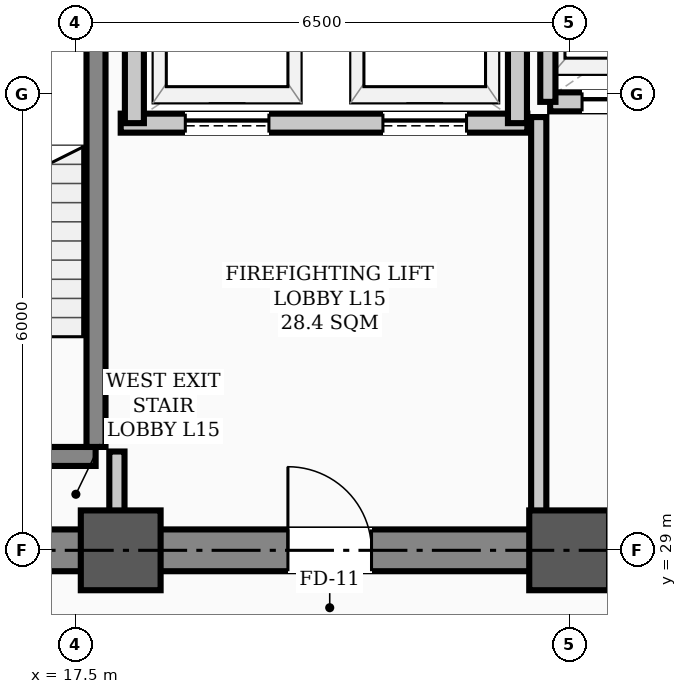
"""IFC4 building model, lengths in metres.
Left out: names, types, materials, properties, quantities, classifications, styles, units other than length and angle.
Written with IfcOpenShell. Run it as: python <this file> out.ifc"""

import sys

from ifc_helpers import new_model, si_unit, direction, frame, frame_2d, origin, origin_2d, place, context, subcontext, project, spatial, rectangle, hollow_rectangle, extrude, element, fill, save


model = new_model("IFC4")
c1 = context("Model", 3, precision=1e-05, world=origin(), true_north=direction((0.0, 1.0)))
c2 = subcontext(c1, "Body", "Model", "MODEL_VIEW")
j1 = project(units=[si_unit("LENGTHUNIT", "METRE"), si_unit("PLANEANGLEUNIT", "RADIAN")], contexts=[c1])
p1 = place(None, origin())
s1 = spatial("IfcSite", under=j1, at=p1, CompositionType="ELEMENT")
p2 = place(p1, origin())
s2 = spatial("IfcBuilding", under=s1, at=p2, CompositionType="ELEMENT")
p3 = place(p2, frame((0.0, 0.0, 61.6)))
s3 = spatial("IfcBuildingStorey", under=s2, at=p3, CompositionType="ELEMENT", Elevation=61.6)
for number, where, z_axis, x_axis in (
    (1, (18.1, 29.0, 0.0), (0.0, 0.0, 1.0), (1.0, 0.0, 0.0)),
    (2, (24.0, 29.0, 0.0), (0.0, 0.0, 1.0), (1.0, 0.0, 0.0)),
):
    element("IfcColumn", number, at=place(p3, frame(where, z_axis=z_axis, x_axis=x_axis)), inside=s3, PredefinedType="COLUMN", context=c2, shape_type="SweptSolid", body=[
        extrude(hollow_rectangle(XDim=1.05, YDim=1.05, WallThickness=0.038, InnerFilletRadius=0.019, OuterFilletRadius=0.057, at=origin_2d()), origin(), (0.0, 0.0, 1.0), 3.9),
    ])
p4 = place(p3, frame((13.5, 29.0, 0.0), z_axis=(0.0, 0.0, 1.0), x_axis=(1.0, 0.0, 0.0)))
e3 = element("IfcWall", 3, at=p4, inside=s3, PredefinedType="SHEAR", context=c2, shape_type="SweptSolid", body=[
    extrude(rectangle(XDim=30.5, YDim=0.55, at=frame_2d((15.25, 0.0))), origin(), (0.0, 0.0, 1.0), 3.72),
])
p5 = place(p4, frame((1.75, 0.0, 0.0)))
e4 = element("IfcOpeningElement", 4, at=p5, cuts=e3, PredefinedType="OPENING", context=c2, shape_type="SweptSolid", body=[
    extrude(rectangle(XDim=1.1, YDim=2.08, at=frame_2d((0.55, 1.04))), frame((0.0, 0.285, 0.0), z_axis=(0.0, -1.0, 0.0), x_axis=(1.0, 0.0, 0.0)), (0.0, 0.0, 1.0), 0.57),
])
p6 = place(p4, frame((26.7, 0.0, 0.0)))
e5 = element("IfcOpeningElement", 5, at=p6, cuts=e3, PredefinedType="OPENING", context=c2, shape_type="SweptSolid", body=[
    extrude(rectangle(XDim=1.1, YDim=2.08, at=frame_2d((0.55, 1.04))), frame((0.0, 0.285, 0.0), z_axis=(0.0, -1.0, 0.0), x_axis=(1.0, 0.0, 0.0)), (0.0, 0.0, 1.0), 0.57),
])
p7 = place(p4, frame((6.8, 0.0, 0.0)))
e6 = element("IfcOpeningElement", 6, at=p7, cuts=e3, PredefinedType="OPENING", context=c2, shape_type="SweptSolid", body=[
    extrude(rectangle(XDim=1.1, YDim=2.08, at=frame_2d((0.55, 1.04))), frame((0.0, 0.285, 0.0), z_axis=(0.0, -1.0, 0.0), x_axis=(1.0, 0.0, 0.0)), (0.0, 0.0, 1.0), 0.57),
])
p8 = place(p4, frame((13.2, 0.0, 0.0)))
e7 = element("IfcOpeningElement", 7, at=p8, cuts=e3, PredefinedType="OPENING", context=c2, shape_type="SweptSolid", body=[
    extrude(rectangle(XDim=1.6, YDim=2.08, at=frame_2d((0.8, 1.04))), frame((0.0, 0.285, 0.0), z_axis=(0.0, -1.0, 0.0), x_axis=(1.0, 0.0, 0.0)), (0.0, 0.0, 1.0), 0.57),
])
p9 = place(p4, frame((19.6, 0.0, 0.0)))
e8 = element("IfcOpeningElement", 8, at=p9, cuts=e3, PredefinedType="OPENING", context=c2, shape_type="SweptSolid", body=[
    extrude(rectangle(XDim=0.9, YDim=2.08, at=frame_2d((0.45, 1.04))), frame((0.0, 0.285, 0.0), z_axis=(0.0, -1.0, 0.0), x_axis=(1.0, 0.0, 0.0)), (0.0, 0.0, 1.0), 0.57),
])
p10 = place(p4, frame((21.6, 0.0, 0.0)))
e9 = element("IfcOpeningElement", 9, at=p10, cuts=e3, PredefinedType="OPENING", context=c2, shape_type="SweptSolid", body=[
    extrude(rectangle(XDim=0.9, YDim=2.08, at=frame_2d((0.45, 1.04))), frame((0.0, 0.285, 0.0), z_axis=(0.0, -1.0, 0.0), x_axis=(1.0, 0.0, 0.0)), (0.0, 0.0, 1.0), 0.57),
])
p11 = place(p3, frame((14.43, 30.235, 0.0), z_axis=(0.0, 0.0, 1.0), x_axis=(1.0, 0.0, 0.0)))
e10 = element("IfcWall", 10, at=p11, inside=s3, PredefinedType="STANDARD", context=c2, shape_type="SweptSolid", body=[
    extrude(rectangle(XDim=3.34, YDim=0.25, at=frame_2d((1.67, 0.0))), origin(), (0.0, 0.0, 1.0), 3.72),
])
p12 = place(p11, frame((1.1, 0.0, 0.0)))
e11 = element("IfcOpeningElement", 11, at=p12, cuts=e10, PredefinedType="OPENING", context=c2, shape_type="SweptSolid", body=[
    extrude(rectangle(XDim=1.1, YDim=2.08, at=frame_2d((0.55, 1.04))), frame((0.0, 0.135, 0.0), z_axis=(0.0, -1.0, 0.0), x_axis=(1.0, 0.0, 0.0)), (0.0, 0.0, 1.0), 0.27),
])
p13 = place(p3, frame((17.775, 30.36, 0.0), z_axis=(0.0, 0.0, 1.0), x_axis=(0.0, 1.0, 0.0)))
e12 = element("IfcWall", 12, at=p13, inside=s3, PredefinedType="STANDARD", context=c2, shape_type="SweptSolid", body=[
    extrude(rectangle(XDim=7.184, YDim=0.25, at=frame_2d((3.592, 0.0))), origin(), (0.0, 0.0, 1.0), 3.72),
])
p14 = place(p3, frame((18.1, 34.62, 0.0), z_axis=(0.0, 0.0, 1.0), x_axis=(1.0, 0.0, 0.0)))
e13 = element("IfcWall", 13, at=p14, inside=s3, PredefinedType="STANDARD", context=c2, shape_type="SweptSolid", body=[
    extrude(rectangle(XDim=5.35, YDim=0.25, at=frame_2d((2.675, 0.0))), origin(), (0.0, 0.0, 1.0), 3.72),
])
p15 = place(p14, frame((0.85, 0.0, 0.0)))
e14 = element("IfcOpeningElement", 14, at=p15, cuts=e13, PredefinedType="OPENING", context=c2, shape_type="SweptSolid", body=[
    extrude(rectangle(XDim=1.1, YDim=2.08, at=frame_2d((0.55, 1.04))), frame((0.0, 0.135, 0.0), z_axis=(0.0, -1.0, 0.0), x_axis=(1.0, 0.0, 0.0)), (0.0, 0.0, 1.0), 0.27),
])
p16 = place(p14, frame((3.45, 0.0, 0.0)))
e15 = element("IfcOpeningElement", 15, at=p16, cuts=e13, PredefinedType="OPENING", context=c2, shape_type="SweptSolid", body=[
    extrude(rectangle(XDim=1.1, YDim=2.08, at=frame_2d((0.55, 1.04))), frame((0.0, 0.135, 0.0), z_axis=(0.0, -1.0, 0.0), x_axis=(1.0, 0.0, 0.0)), (0.0, 0.0, 1.0), 0.27),
])
for number, where, z_axis, x_axis in (
    (16, (18.28, 34.62, 0.0), (0.0, 0.0, 1.0), (0.0, 1.0, 0.0)),
    (17, (23.32, 34.62, 0.0), (0.0, 0.0, 1.0), (0.0, 1.0, 0.0)),
):
    element("IfcWall", number, at=place(p3, frame(where, z_axis=z_axis, x_axis=x_axis)), inside=s3, PredefinedType="STANDARD", context=c2, shape_type="SweptSolid", body=[
        extrude(rectangle(XDim=3.33, YDim=0.25, at=frame_2d((1.665, 0.0))), origin(), (0.0, 0.0, 1.0), 3.3),
    ])
p17 = place(p3, frame((23.75, 34.9, 0.0), z_axis=(0.0, 0.0, 1.0), x_axis=(1.0, 0.0, 0.0)))
e18 = element("IfcWall", 18, at=p17, inside=s3, PredefinedType="STANDARD", context=c2, shape_type="SweptSolid", body=[
    extrude(rectangle(XDim=4.4, YDim=0.25, at=frame_2d((2.2, 0.0))), origin(), (0.0, 0.0, 1.0), 3.72),
])
p18 = place(p17, frame((0.42, 0.0, 0.0)))
e19 = element("IfcOpeningElement", 19, at=p18, cuts=e18, PredefinedType="OPENING", context=c2, shape_type="SweptSolid", body=[
    extrude(rectangle(XDim=1.3, YDim=2.08, at=frame_2d((0.65, 1.04))), frame((0.0, 0.135, 0.0), z_axis=(0.0, -1.0, 0.0), x_axis=(1.0, 0.0, 0.0)), (0.0, 0.0, 1.0), 0.27),
])
p19 = place(p17, frame((2.68, 0.0, 0.0)))
e20 = element("IfcOpeningElement", 20, at=p19, cuts=e18, PredefinedType="OPENING", context=c2, shape_type="SweptSolid", body=[
    extrude(rectangle(XDim=1.3, YDim=2.08, at=frame_2d((0.65, 1.04))), frame((0.0, 0.135, 0.0), z_axis=(0.0, -1.0, 0.0), x_axis=(1.0, 0.0, 0.0)), (0.0, 0.0, 1.0), 0.27),
])
p20 = place(p3, frame((18.05, 29.285, 0.0), z_axis=(0.0, 0.0, 1.0), x_axis=(0.0, 1.0, 0.0)))
e21 = element("IfcWall", 21, at=p20, inside=s3, PredefinedType="STANDARD", context=c2, shape_type="SweptSolid", body=[
    extrude(rectangle(XDim=1.015, YDim=0.2, at=frame_2d((0.508, 0.0))), origin(), (0.0, 0.0, 1.0), 3.3),
])
p21 = place(p3, frame((23.6, 29.285, 0.0), z_axis=(0.0, 0.0, 1.0), x_axis=(0.0, 1.0, 0.0)))
e22 = element("IfcWall", 22, at=p21, inside=s3, PredefinedType="STANDARD", context=c2, shape_type="SweptSolid", body=[
    extrude(rectangle(XDim=5.415, YDim=0.2, at=frame_2d((2.708, 0.0))), origin(), (0.0, 0.0, 1.0), 3.1),
])
p22 = place(p3, frame((23.72, 34.9, 0.0), z_axis=(0.0, 0.0, 1.0), x_axis=(0.0, 1.0, 0.0)))
e23 = element("IfcWall", 23, at=p22, inside=s3, PredefinedType="STANDARD", context=c2, shape_type="SweptSolid", body=[
    extrude(rectangle(XDim=3.12, YDim=0.2, at=frame_2d((1.56, 0.0))), origin(), (0.0, 0.0, 1.0), 3.1),
])
p23 = place(p7, origin())
e24 = element("IfcDoor", 24, at=p23, inside=s3, OperationType="SINGLE_SWING_LEFT", PredefinedType="DOOR", context=c2, shape_type="SweptSolid", body=[
    extrude(rectangle(XDim=1.1, YDim=2.08, at=frame_2d((0.55, 1.04))), frame((0.0, 0.025, 0.0), z_axis=(0.0, -1.0, 0.0), x_axis=(1.0, 0.0, 0.0)), (0.0, 0.0, 1.0), 0.05),
])
fill(e6, e24)
p24 = place(p15, origin())
e25 = element("IfcDoor", 25, at=p24, inside=s3, OperationType="SLIDING_TO_LEFT", PredefinedType="DOOR", context=c2, shape_type="SweptSolid", body=[
    extrude(rectangle(XDim=1.1, YDim=2.08, at=frame_2d((0.55, 1.04))), frame((0.0, 0.025, 0.0), z_axis=(0.0, -1.0, 0.0), x_axis=(1.0, 0.0, 0.0)), (0.0, 0.0, 1.0), 0.05),
])
fill(e14, e25)
p25 = place(p16, origin())
e26 = element("IfcDoor", 26, at=p25, inside=s3, OperationType="SLIDING_TO_LEFT", PredefinedType="DOOR", context=c2, shape_type="SweptSolid", body=[
    extrude(rectangle(XDim=1.1, YDim=2.08, at=frame_2d((0.55, 1.04))), frame((0.0, 0.025, 0.0), z_axis=(0.0, -1.0, 0.0), x_axis=(1.0, 0.0, 0.0)), (0.0, 0.0, 1.0), 0.05),
])
fill(e15, e26)
p26 = place(p18, origin())
e27 = element("IfcDoor", 27, at=p26, inside=s3, OperationType="DOUBLE_DOOR_SLIDING", PredefinedType="DOOR", context=c2, shape_type="SweptSolid", body=[
    extrude(rectangle(XDim=1.3, YDim=2.08, at=frame_2d((0.65, 1.04))), frame((0.0, 0.025, 0.0), z_axis=(0.0, -1.0, 0.0), x_axis=(1.0, 0.0, 0.0)), (0.0, 0.0, 1.0), 0.05),
])
fill(e19, e27)
save(model, sys.argv[1])
